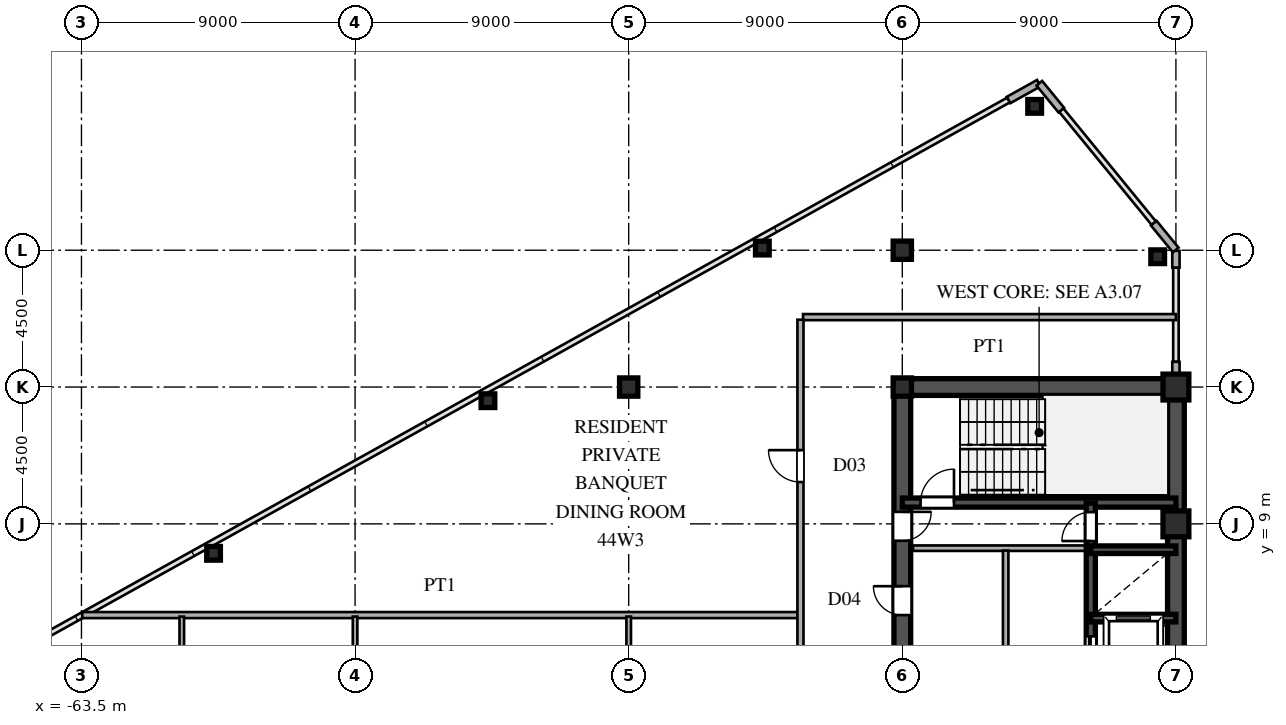
"""IFC4 building model, lengths in metres.
Left out: names, types, materials, properties, quantities, classifications, styles, units other than length and angle.
Written with IfcOpenShell. Run it as: python <this file> out.ifc"""

import sys

from ifc_helpers import new_model, si_unit, direction, frame, frame_2d, origin, origin_2d, place, context, subcontext, project, spatial, rectangle, hollow_rectangle, i_section, extrude, source, transform, mapped, element, fill, save


model = new_model("IFC4")
c1 = context("Model", 3, precision=1e-05, world=origin(), true_north=direction((0.0, 1.0)))
c2 = subcontext(c1, "Body", "Model", "MODEL_VIEW")
j1 = project(units=[si_unit("LENGTHUNIT", "METRE"), si_unit("PLANEANGLEUNIT", "RADIAN")], contexts=[c1])
p1 = place(None, origin())
s1 = spatial("IfcSite", under=j1, at=p1, CompositionType="ELEMENT")
p2 = place(p1, origin())
s2 = spatial("IfcBuilding", under=s1, at=p2, CompositionType="ELEMENT")
p3 = place(p2, frame((0.0, 0.0, 167.1)))
s3 = spatial("IfcBuildingStorey", under=s2, at=p3, CompositionType="ELEMENT", Elevation=167.1)
m1 = source(origin(), c2, "Body", "SweptSolid", [
    extrude(hollow_rectangle(XDim=0.85, YDim=0.85, WallThickness=0.036, at=origin_2d()), origin(), (0.0, 0.0, 1.0), 3.6),
])
for number, where, z_axis, x_axis in (
    (1, (-27.5, 9.0, 0.0), (0.0, 0.0, 1.0), (1.0, 0.0, 0.0)),
    (2, (-27.5, 13.5, 0.0), (0.0, 0.0, 1.0), (1.0, 0.0, 0.0)),
):
    element("IfcColumn", number, at=place(p3, frame(where, z_axis=z_axis, x_axis=x_axis)), inside=s3, PredefinedType="COLUMN", context=c2, shape_type="MappedRepresentation", body=[
        mapped(m1, transform((0.0, 0.0, 0.0), scale=1.0)),
    ])
m2 = source(origin(), c2, "Body", "SweptSolid", [
    extrude(i_section(OverallWidth=0.6, OverallDepth=0.6, WebThickness=0.025, FlangeThickness=0.04, at=origin_2d()), origin(), (0.0, 0.0, 1.0), 3.6),
])
for number, where, z_axis, x_axis in (
    (3, (-36.5, 13.5, 0.0), (0.0, 0.0, 1.0), (1.0, 0.0, 0.0)),
    (4, (-36.5, 18.0, 0.0), (0.0, 0.0, 1.0), (1.0, 0.0, 0.0)),
    (5, (-45.5, 13.5, 0.0), (0.0, 0.0, 1.0), (1.0, 0.0, 0.0)),
):
    element("IfcColumn", number, at=place(p3, frame(where, z_axis=z_axis, x_axis=x_axis)), inside=s3, PredefinedType="COLUMN", context=c2, shape_type="MappedRepresentation", body=[
        mapped(m2, transform((0.0, 0.0, 0.0), scale=1.0)),
    ])
m3 = source(origin(), c2, "Body", "SweptSolid", [
    extrude(hollow_rectangle(XDim=0.45, YDim=0.45, WallThickness=0.018, at=origin_2d()), origin(), (0.0, 0.0, 1.0), 3.6),
])
for number, where, z_axis, x_axis in (
    (6, (-28.1, 17.786, 0.0), (0.0, 0.0, 1.0), (1.0, 0.0, 0.0)),
    (7, (-32.147, 22.732, 0.0), (0.0, 0.0, 1.0), (1.0, 0.0, 0.0)),
    (8, (-41.104, 18.071, 0.0), (0.0, 0.0, 1.0), (1.0, 0.0, 0.0)),
    (9, (-50.129, 13.051, 0.0), (0.0, 0.0, 1.0), (1.0, 0.0, 0.0)),
    (10, (-59.155, 8.031, 0.0), (0.0, 0.0, 1.0), (1.0, 0.0, 0.0)),
):
    element("IfcColumn", number, at=place(p3, frame(where, z_axis=z_axis, x_axis=x_axis)), inside=s3, PredefinedType="COLUMN", context=c2, shape_type="MappedRepresentation", body=[
        mapped(m3, transform((0.0, 0.0, 0.0), scale=1.0)),
    ])
p4 = place(p3, frame((-27.5, 13.78, 0.0), z_axis=(0.0, 0.0, 1.0), x_axis=(0.0, 1.0, 0.0)))
e11 = element("IfcWall", 11, at=p4, inside=s3, PredefinedType="SOLIDWALL", context=c2, shape_type="SweptSolid", body=[
    extrude(rectangle(XDim=0.55, YDim=0.24, at=frame_2d((0.275, 0.0))), origin(), (0.0, 0.0, 1.0), 2.88),
])
p5 = place(p3, frame((-27.5, 17.43, 0.0), z_axis=(0.0, 0.0, 1.0), x_axis=(0.0, 1.0, 0.0)))
e12 = element("IfcWall", 12, at=p5, inside=s3, PredefinedType="SOLIDWALL", context=c2, shape_type="SweptSolid", body=[
    extrude(rectangle(XDim=0.55, YDim=0.24, at=frame_2d((0.275, 0.0))), origin(), (0.0, 0.0, 1.0), 3.38),
])
for number, where, z_axis, x_axis in (
    (13, (-27.506, 18.008, 0.0), (0.0, 0.0, 1.0), (-0.633, 0.774, 0.0)),
    (14, (-31.272, 22.61, 0.0), (0.0, 0.0, 1.0), (-0.633, 0.774, 0.0)),
):
    element("IfcWall", number, at=place(p3, frame(where, z_axis=z_axis, x_axis=x_axis)), inside=s3, PredefinedType="SOLIDWALL", context=c2, shape_type="SweptSolid", body=[
        extrude(rectangle(XDim=1.14, YDim=0.24, at=frame_2d((0.57, 0.0))), origin(), (0.0, 0.0, 1.0), 3.38),
    ])
p6 = place(p3, frame((-32.009, 23.495, 0.0), z_axis=(0.0, 0.0, 1.0), x_axis=(-0.87385402111, -0.486188389196, 0.0)))
e15 = element("IfcWall", 15, at=p6, inside=s3, PredefinedType="SOLIDWALL", context=c2, shape_type="SweptSolid", body=[
    extrude(rectangle(XDim=1.14, YDim=0.24, at=frame_2d((0.57, 0.0))), origin(), (0.0, 0.0, 1.0), 3.38),
])
p7 = place(p3, frame((-27.5, 1.3, 0.0), z_axis=(0.0, 0.0, 1.0), x_axis=(0.0, 1.0, 0.0)))
e16 = element("IfcWall", 16, at=p7, inside=s3, PredefinedType="SHEAR", context=c2, shape_type="SweptSolid", body=[
    extrude(rectangle(XDim=12.2, YDim=0.55, at=frame_2d((6.1, 0.0))), origin(), (0.0, 0.0, 1.0), 3.38),
])
p8 = place(p3, frame((-36.5, 13.5, 0.0), z_axis=(0.0, 0.0, 1.0), x_axis=(1.0, 0.0, 0.0)))
e17 = element("IfcWall", 17, at=p8, inside=s3, PredefinedType="SHEAR", context=c2, shape_type="SweptSolid", body=[
    extrude(rectangle(XDim=9.0, YDim=0.55, at=frame_2d((4.5, 0.0))), origin(), (0.0, 0.0, 1.0), 3.38),
])
p9 = place(p3, frame((-36.5, 8.2, 0.0), z_axis=(0.0, 0.0, 1.0), x_axis=(0.0, 1.0, 0.0)))
e18 = element("IfcWall", 18, at=p9, inside=s3, PredefinedType="SHEAR", context=c2, shape_type="SweptSolid", body=[
    extrude(rectangle(XDim=5.45, YDim=0.55, at=frame_2d((2.725, 0.0))), origin(), (0.0, 0.0, 1.0), 3.38),
])
p10 = place(p9, frame((0.245, 0.0, 0.0)))
e19 = element("IfcOpeningElement", 19, at=p10, cuts=e18, PredefinedType="OPENING", context=c2, shape_type="SweptSolid", body=[
    extrude(rectangle(XDim=0.95, YDim=2.15, at=frame_2d((0.475, 1.075))), frame((0.0, 0.285, 0.0), z_axis=(0.0, -1.0, 0.0), x_axis=(1.0, 0.0, 0.0)), (0.0, 0.0, 1.0), 0.57),
])
p11 = place(p3, frame((-36.5, 4.75, 0.0), z_axis=(0.0, 0.0, 1.0), x_axis=(0.0, 1.0, 0.0)))
e20 = element("IfcWall", 20, at=p11, inside=s3, PredefinedType="SHEAR", context=c2, shape_type="SweptSolid", body=[
    extrude(rectangle(XDim=3.45, YDim=0.55, at=frame_2d((1.725, 0.0))), origin(), (0.0, 0.0, 1.0), 3.38),
])
p12 = place(p11, frame((1.25, 0.0, 0.0)))
e21 = element("IfcOpeningElement", 21, at=p12, cuts=e20, PredefinedType="OPENING", context=c2, shape_type="SweptSolid", body=[
    extrude(rectangle(XDim=0.95, YDim=2.15, at=frame_2d((0.475, 1.075))), frame((0.0, 0.285, 0.0), z_axis=(0.0, -1.0, 0.0), x_axis=(1.0, 0.0, 0.0)), (0.0, 0.0, 1.0), 0.57),
])
p13 = place(p3, frame((-36.5, 9.7, 0.0), z_axis=(0.0, 0.0, 1.0), x_axis=(1.0, 0.0, 0.0)))
e22 = element("IfcWall", 22, at=p13, inside=s3, PredefinedType="SHEAR", context=c2, shape_type="SweptSolid", body=[
    extrude(rectangle(XDim=9.0, YDim=0.3, at=frame_2d((4.5, 0.0))), origin(), (0.0, 0.0, 1.0), 3.38),
])
p14 = place(p13, frame((0.6, 0.0, 0.0)))
e23 = element("IfcOpeningElement", 23, at=p14, cuts=e22, PredefinedType="OPENING", context=c2, shape_type="SweptSolid", body=[
    extrude(rectangle(XDim=1.1, YDim=2.2, at=frame_2d((0.55, 1.1))), frame((0.0, 0.16, 0.0), z_axis=(0.0, -1.0, 0.0), x_axis=(1.0, 0.0, 0.0)), (0.0, 0.0, 1.0), 0.32),
])
for number, where, z_axis, x_axis in (
    (24, (-30.3, 5.9, 0.0), (0.0, 0.0, 1.0), (1.0, 0.0, 0.0)),
    (25, (-30.3, 8.15, 0.0), (0.0, 0.0, 1.0), (1.0, 0.0, 0.0)),
):
    element("IfcWall", number, at=place(p3, frame(where, z_axis=z_axis, x_axis=x_axis)), inside=s3, PredefinedType="SHEAR", context=c2, shape_type="SweptSolid", body=[
        extrude(rectangle(XDim=2.8, YDim=0.25, at=frame_2d((1.4, 0.0))), origin(), (0.0, 0.0, 1.0), 3.38),
    ])
p15 = place(p3, frame((-30.3, 3.6, 0.0), z_axis=(0.0, 0.0, 1.0), x_axis=(0.0, 1.0, 0.0)))
e26 = element("IfcWall", 26, at=p15, inside=s3, PredefinedType="SHEAR", context=c2, shape_type="SweptSolid", body=[
    extrude(rectangle(XDim=2.3, YDim=0.3, at=frame_2d((1.15, 0.0))), origin(), (0.0, 0.0, 1.0), 3.38),
])
p16 = place(p15, frame((0.6, 0.0, 0.0)))
e27 = element("IfcOpeningElement", 27, at=p16, cuts=e26, PredefinedType="OPENING", context=c2, shape_type="SweptSolid", body=[
    extrude(rectangle(XDim=1.1, YDim=2.2, at=frame_2d((0.55, 1.1))), frame((0.0, 0.16, 0.0), z_axis=(0.0, -1.0, 0.0), x_axis=(1.0, 0.0, 0.0)), (0.0, 0.0, 1.0), 0.32),
])
p17 = place(p3, frame((-30.3, 5.9, 0.0), z_axis=(0.0, 0.0, 1.0), x_axis=(0.0, 1.0, 0.0)))
e28 = element("IfcWall", 28, at=p17, inside=s3, PredefinedType="SHEAR", context=c2, shape_type="SweptSolid", body=[
    extrude(rectangle(XDim=2.25, YDim=0.3, at=frame_2d((1.125, 0.0))), origin(), (0.0, 0.0, 1.0), 3.38),
])
p18 = place(p3, frame((-30.3, 8.15, 0.0), z_axis=(0.0, 0.0, 1.0), x_axis=(0.0, 1.0, 0.0)))
e29 = element("IfcWall", 29, at=p18, inside=s3, PredefinedType="SHEAR", context=c2, shape_type="SweptSolid", body=[
    extrude(rectangle(XDim=1.53, YDim=0.3, at=frame_2d((0.765, 0.0))), origin(), (0.0, 0.0, 1.0), 3.38),
])
p19 = place(p18, frame((0.285, 0.0, 0.0)))
e30 = element("IfcOpeningElement", 30, at=p19, cuts=e29, PredefinedType="OPENING", context=c2, shape_type="SweptSolid", body=[
    extrude(rectangle(XDim=0.95, YDim=2.15, at=frame_2d((0.475, 1.075))), frame((0.0, 0.16, 0.0), z_axis=(0.0, -1.0, 0.0), x_axis=(1.0, 0.0, 0.0)), (0.0, 0.0, 1.0), 0.32),
])
p20 = place(p3, frame((-36.15, 8.2, 0.0), z_axis=(0.0, 0.0, 1.0), x_axis=(1.0, 0.0, 0.0)))
e31 = element("IfcWall", 31, at=p20, inside=s3, PredefinedType="PARTITIONING", context=c2, shape_type="SweptSolid", body=[
    extrude(rectangle(XDim=5.7, YDim=0.18, at=frame_2d((2.85, 0.0))), origin(), (0.0, 0.0, 1.0), 3.38),
])
p21 = place(p3, frame((-33.1, 1.38, 0.0), z_axis=(0.0, 0.0, 1.0), x_axis=(0.0, 1.0, 0.0)))
e32 = element("IfcWall", 32, at=p21, inside=s3, PredefinedType="PARTITIONING", context=c2, shape_type="SweptSolid", body=[
    extrude(rectangle(XDim=6.74, YDim=0.18, at=frame_2d((3.37, 0.0))), origin(), (0.0, 0.0, 1.0), 3.38),
])
p22 = place(p3, frame((-63.476, 6.0, 0.0), z_axis=(0.0, 0.0, 1.0), x_axis=(1.0, 0.0, 0.0)))
e33 = element("IfcWall", 33, at=p22, inside=s3, PredefinedType="PARTITIONING", context=c2, shape_type="SweptSolid", body=[
    extrude(rectangle(XDim=23.546, YDim=0.2, at=frame_2d((11.773, 0.0))), origin(), (0.0, 0.0, 1.0), 3.38),
])
p23 = place(p3, frame((-39.765, 15.8, 0.0), z_axis=(0.0, 0.0, 1.0), x_axis=(1.0, 0.0, 0.0)))
e34 = element("IfcWall", 34, at=p23, inside=s3, PredefinedType="PARTITIONING", context=c2, shape_type="SweptSolid", body=[
    extrude(rectangle(XDim=12.265, YDim=0.2, at=frame_2d((6.132, 0.0))), origin(), (0.0, 0.0, 1.0), 3.38),
])
p24 = place(p3, frame((-60.2, -3.283, 0.0), z_axis=(0.0, 0.0, 1.0), x_axis=(0.0, 1.0, 0.0)))
e35 = element("IfcWall", 35, at=p24, inside=s3, PredefinedType="PARTITIONING", context=c2, shape_type="SweptSolid", body=[
    extrude(rectangle(XDim=9.233, YDim=0.15, at=frame_2d((4.616, 0.0))), origin(), (0.0, 0.0, 1.0), 3.38),
])
p25 = place(p24, frame((1.808, 0.0, 0.0)))
e36 = element("IfcOpeningElement", 36, at=p25, cuts=e35, PredefinedType="OPENING", context=c2, shape_type="SweptSolid", body=[
    extrude(rectangle(XDim=0.95, YDim=2.15, at=frame_2d((0.475, 1.075))), frame((0.0, 0.085, 0.0), z_axis=(0.0, -1.0, 0.0), x_axis=(1.0, 0.0, 0.0)), (0.0, 0.0, 1.0), 0.17),
])
p26 = place(p24, frame((6.475, 0.0, 0.0)))
e37 = element("IfcOpeningElement", 37, at=p26, cuts=e35, PredefinedType="OPENING", context=c2, shape_type="SweptSolid", body=[
    extrude(rectangle(XDim=0.95, YDim=2.15, at=frame_2d((0.475, 1.075))), frame((0.0, 0.085, 0.0), z_axis=(0.0, -1.0, 0.0), x_axis=(1.0, 0.0, 0.0)), (0.0, 0.0, 1.0), 0.17),
])
p27 = place(p3, frame((-54.5, -7.95, 0.0), z_axis=(0.0, 0.0, 1.0), x_axis=(0.0, 1.0, 0.0)))
e38 = element("IfcWall", 38, at=p27, inside=s3, PredefinedType="PARTITIONING", context=c2, shape_type="SweptSolid", body=[
    extrude(rectangle(XDim=13.9, YDim=0.15, at=frame_2d((6.95, 0.0))), origin(), (0.0, 0.0, 1.0), 2.78),
])
p28 = place(p27, frame((6.475, 0.0, 0.0)))
e39 = element("IfcOpeningElement", 39, at=p28, cuts=e38, PredefinedType="OPENING", context=c2, shape_type="SweptSolid", body=[
    extrude(rectangle(XDim=0.95, YDim=2.15, at=frame_2d((0.475, 1.075))), frame((0.0, 0.085, 0.0), z_axis=(0.0, -1.0, 0.0), x_axis=(1.0, 0.0, 0.0)), (0.0, 0.0, 1.0), 0.17),
])
p29 = place(p3, frame((-45.5, 1.852, 0.0), z_axis=(0.0, 0.0, 1.0), x_axis=(0.0, 1.0, 0.0)))
e40 = element("IfcWall", 40, at=p29, inside=s3, PredefinedType="PARTITIONING", context=c2, shape_type="SweptSolid", body=[
    extrude(rectangle(XDim=4.098, YDim=0.15, at=frame_2d((2.049, 0.0))), origin(), (0.0, 0.0, 1.0), 2.78),
])
p30 = place(p3, frame((-39.85, -15.715, 0.0), z_axis=(0.0, 0.0, 1.0), x_axis=(0.0, 1.0, 0.0)))
e41 = element("IfcWall", 41, at=p30, inside=s3, PredefinedType="PARTITIONING", context=c2, shape_type="SweptSolid", body=[
    extrude(rectangle(XDim=31.43, YDim=0.2, at=frame_2d((15.715, 0.0))), origin(), (0.0, 0.0, 1.0), 3.38),
])
p31 = place(p30, frame((3.29, 0.0, 0.0)))
e42 = element("IfcOpeningElement", 42, at=p31, cuts=e41, PredefinedType="OPENING", context=c2, shape_type="SweptSolid", body=[
    extrude(rectangle(XDim=1.05, YDim=2.25, at=frame_2d((0.525, 1.125))), frame((0.0, 0.11, 0.0), z_axis=(0.0, -1.0, 0.0), x_axis=(1.0, 0.0, 0.0)), (0.0, 0.0, 1.0), 0.22),
])
p32 = place(p30, frame((13.98, 0.0, 0.0)))
e43 = element("IfcOpeningElement", 43, at=p32, cuts=e41, PredefinedType="OPENING", context=c2, shape_type="SweptSolid", body=[
    extrude(rectangle(XDim=1.05, YDim=2.25, at=frame_2d((0.525, 1.125))), frame((0.0, 0.11, 0.0), z_axis=(0.0, -1.0, 0.0), x_axis=(1.0, 0.0, 0.0)), (0.0, 0.0, 1.0), 0.22),
])
p33 = place(p30, frame((26.09, 0.0, 0.0)))
e44 = element("IfcOpeningElement", 44, at=p33, cuts=e41, PredefinedType="OPENING", context=c2, shape_type="SweptSolid", body=[
    extrude(rectangle(XDim=1.05, YDim=2.25, at=frame_2d((0.525, 1.125))), frame((0.0, 0.11, 0.0), z_axis=(0.0, -1.0, 0.0), x_axis=(1.0, 0.0, 0.0)), (0.0, 0.0, 1.0), 0.22),
])
m4 = source(origin(), c2, "Body", "SweptSolid", [
    extrude(rectangle(XDim=0.95, YDim=2.15, at=frame_2d((0.475, 1.075))), frame((0.0, 0.025, 0.0), z_axis=(0.0, -1.0, 0.0), x_axis=(1.0, 0.0, 0.0)), (0.0, 0.0, 1.0), 0.05),
])
p34 = place(p10, frame((0.95, 0.0, 0.0), z_axis=(0.0, 0.0, 1.0), x_axis=(-1.0, 0.0, 0.0)))
e45 = element("IfcDoor", 45, at=p34, inside=s3, OperationType="SINGLE_SWING_RIGHT", PredefinedType="DOOR", context=c2, shape_type="MappedRepresentation", body=[
    mapped(m4, transform((0.0, 0.0, 0.0), scale=1.0)),
])
fill(e19, e45)
p35 = place(p12, origin())
e46 = element("IfcDoor", 46, at=p35, inside=s3, OperationType="SINGLE_SWING_RIGHT", PredefinedType="DOOR", context=c2, shape_type="MappedRepresentation", body=[
    mapped(m4, transform((0.0, 0.0, 0.0), scale=1.0)),
])
fill(e21, e46)
m5 = source(origin(), c2, "Body", "SweptSolid", [
    extrude(rectangle(XDim=1.1, YDim=2.2, at=frame_2d((0.55, 1.1))), frame((0.0, 0.025, 0.0), z_axis=(0.0, -1.0, 0.0), x_axis=(1.0, 0.0, 0.0)), (0.0, 0.0, 1.0), 0.05),
])
p36 = place(p14, origin())
e47 = element("IfcDoor", 47, at=p36, inside=s3, OperationType="SINGLE_SWING_RIGHT", PredefinedType="DOOR", context=c2, shape_type="MappedRepresentation", body=[
    mapped(m5, transform((0.0, 0.0, 0.0), scale=1.0)),
])
fill(e23, e47)
m6 = source(origin(), c2, "Body", "SweptSolid", [
    extrude(rectangle(XDim=1.1, YDim=2.2, at=frame_2d((0.55, 1.1))), frame((0.0, 0.025, 0.0), z_axis=(0.0, -1.0, 0.0), x_axis=(1.0, 0.0, 0.0)), (0.0, 0.0, 1.0), 0.05),
])
p37 = place(p16, origin())
e48 = element("IfcDoor", 48, at=p37, inside=s3, OperationType="DOUBLE_DOOR_SLIDING", PredefinedType="DOOR", context=c2, shape_type="MappedRepresentation", body=[
    mapped(m6, transform((0.0, 0.0, 0.0), scale=1.0)),
])
fill(e27, e48)
p38 = place(p19, origin())
e49 = element("IfcDoor", 49, at=p38, inside=s3, OperationType="SINGLE_SWING_LEFT", PredefinedType="DOOR", context=c2, shape_type="MappedRepresentation", body=[
    mapped(m4, transform((0.0, 0.0, 0.0), scale=1.0)),
])
fill(e30, e49)
m7 = source(origin(), c2, "Body", "SweptSolid", [
    extrude(rectangle(XDim=1.05, YDim=2.25, at=frame_2d((0.525, 1.125))), frame((0.0, 0.025, 0.0), z_axis=(0.0, -1.0, 0.0), x_axis=(1.0, 0.0, 0.0)), (0.0, 0.0, 1.0), 0.05),
])
p39 = place(p33, origin())
e50 = element("IfcDoor", 50, at=p39, inside=s3, OperationType="SINGLE_SWING_RIGHT", PredefinedType="DOOR", context=c2, shape_type="MappedRepresentation", body=[
    mapped(m7, transform((0.0, 0.0, 0.0), scale=1.0)),
])
fill(e44, e50)
save(model, sys.argv[1])
